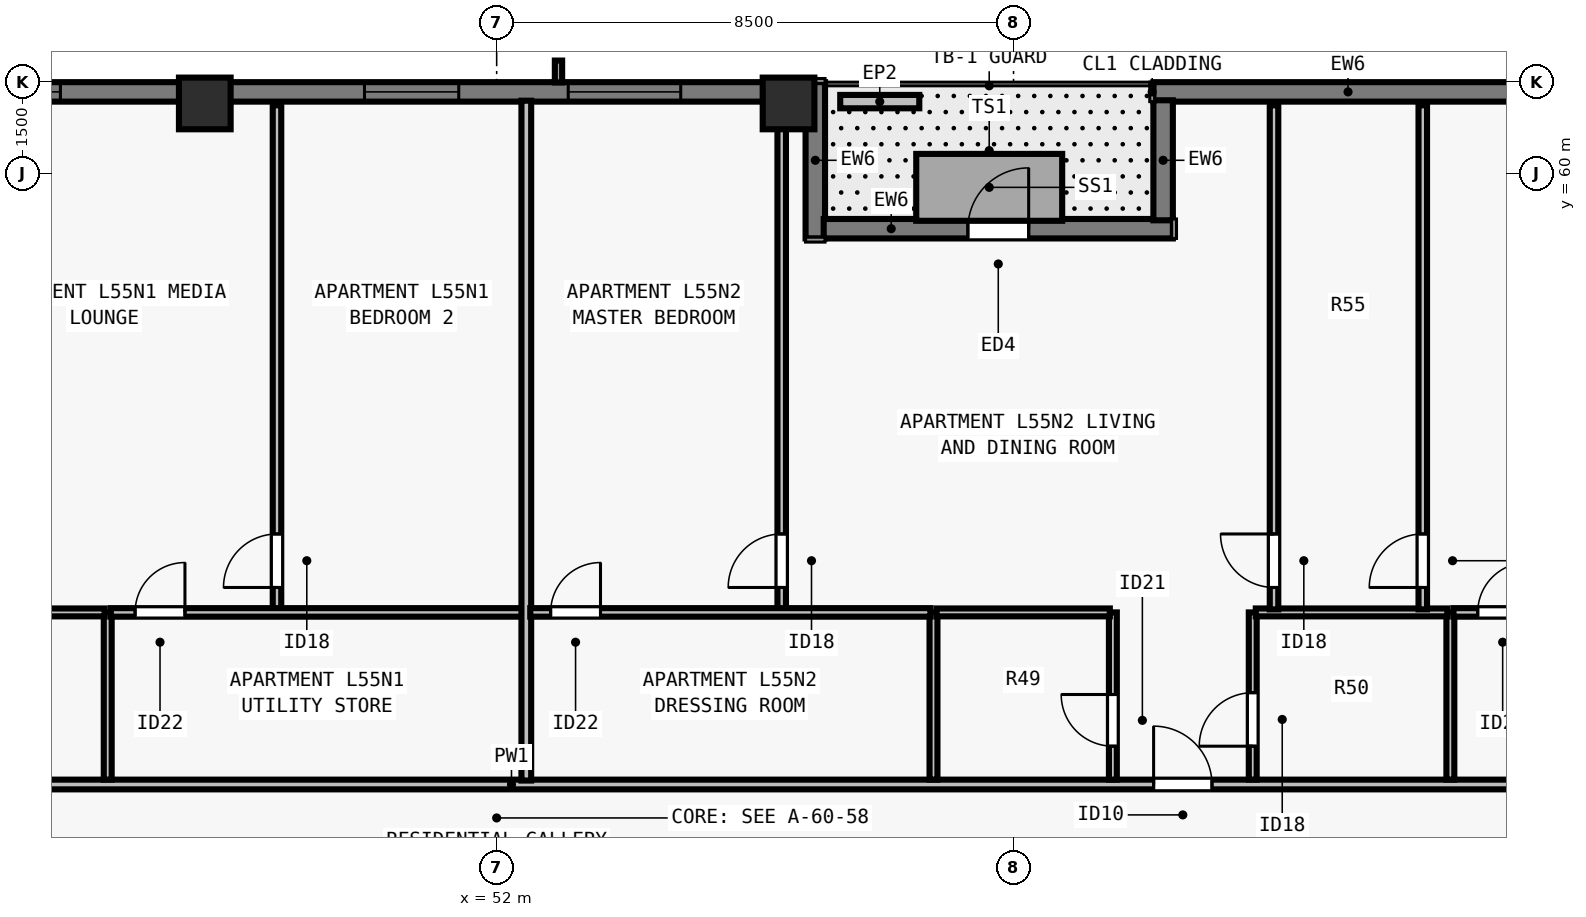
"""IFC4 building model, lengths in metres.
Left out: names, types, materials, properties, quantities, classifications, styles, units other than length and angle.
Written with IfcOpenShell. Run it as: python <this file> out.ifc"""

import sys

from ifc_helpers import new_model, si_unit, direction, frame, frame_2d, origin, origin_2d, place, context, subcontext, project, spatial, rectangle, extrude, element, fill, save


model = new_model("IFC4")
c1 = context("Model", 3, precision=1e-05, world=origin(), true_north=direction((0.0, 1.0)))
c2 = subcontext(c1, "Body", "Model", "MODEL_VIEW")
j1 = project(units=[si_unit("LENGTHUNIT", "METRE"), si_unit("PLANEANGLEUNIT", "RADIAN")], contexts=[c1])
p1 = place(None, origin())
s1 = spatial("IfcSite", under=j1, at=p1, CompositionType="ELEMENT")
p2 = place(p1, origin())
s2 = spatial("IfcBuilding", under=s1, at=p2, CompositionType="ELEMENT")
p3 = place(p2, frame((0.0, 0.0, 202.5)))
s3 = spatial("IfcBuildingStorey", under=s2, at=p3, CompositionType="ELEMENT", Elevation=202.5)
for number, where, z_axis, x_axis in (
    (1, (56.8, 61.15, 0.0), (0.0, 0.0, 1.0), (1.0, 0.0, 0.0)),
    (2, (47.2, 61.15, 0.0), (0.0, 0.0, 1.0), (1.0, 0.0, 0.0)),
):
    element("IfcColumn", number, at=place(p3, frame(where, z_axis=z_axis, x_axis=x_axis)), inside=s3, PredefinedType="COLUMN", context=c2, shape_type="SweptSolid", body=[
        extrude(rectangle(XDim=0.85, YDim=0.85, at=origin_2d()), origin(), (0.0, 0.0, 1.0), 3.5),
    ])
p4 = place(p3, frame((62.8, 61.34, 0.0), z_axis=(0.0, 0.0, 1.0), x_axis=(1.0, 0.0, 0.0)))
e3 = element("IfcWall", 3, at=p4, inside=s3, PredefinedType="SOLIDWALL", context=c2, shape_type="SweptSolid", body=[
    extrude(rectangle(XDim=6.402, YDim=0.32, at=frame_2d((3.201, 0.0))), origin(), (0.0, 0.0, 1.0), 3.29),
])
p5 = place(p3, frame((34.5, 61.34, 0.0), z_axis=(0.0, 0.0, 1.0), x_axis=(1.0, 0.0, 0.0)))
e4 = element("IfcWall", 4, at=p5, inside=s3, PredefinedType="SOLIDWALL", context=c2, shape_type="SweptSolid", body=[
    extrude(rectangle(XDim=22.602, YDim=0.32, at=frame_2d((11.301, 0.0))), origin(), (0.0, 0.0, 1.0), 3.29),
])
p6 = place(p5, frame((4.675, 0.0, 0.8)))
e5 = element("IfcOpeningElement", 5, at=p6, cuts=e4, PredefinedType="OPENING", context=c2, shape_type="SweptSolid", body=[
    extrude(rectangle(XDim=1.85, YDim=1.678, at=frame_2d((0.925, 0.839))), frame((0.0, 0.17, 0.0), z_axis=(0.0, -1.0, 0.0), x_axis=(1.0, 0.0, 0.0)), (0.0, 0.0, 1.0), 0.34),
])
p7 = place(p5, frame((8.776, 0.0, 0.8)))
e6 = element("IfcOpeningElement", 6, at=p7, cuts=e4, PredefinedType="OPENING", context=c2, shape_type="SweptSolid", body=[
    extrude(rectangle(XDim=1.55, YDim=1.678, at=frame_2d((0.775, 0.839))), frame((0.0, 0.17, 0.0), z_axis=(0.0, -1.0, 0.0), x_axis=(1.0, 0.0, 0.0)), (0.0, 0.0, 1.0), 0.34),
])
p8 = place(p5, frame((15.326, 0.0, 0.8)))
e7 = element("IfcOpeningElement", 7, at=p8, cuts=e4, PredefinedType="OPENING", context=c2, shape_type="SweptSolid", body=[
    extrude(rectangle(XDim=1.55, YDim=1.678, at=frame_2d((0.775, 0.839))), frame((0.0, 0.17, 0.0), z_axis=(0.0, -1.0, 0.0), x_axis=(1.0, 0.0, 0.0)), (0.0, 0.0, 1.0), 0.34),
])
p9 = place(p5, frame((18.677, 0.0, 0.8)))
e8 = element("IfcOpeningElement", 8, at=p9, cuts=e4, PredefinedType="OPENING", context=c2, shape_type="SweptSolid", body=[
    extrude(rectangle(XDim=1.85, YDim=1.678, at=frame_2d((0.925, 0.839))), frame((0.0, 0.17, 0.0), z_axis=(0.0, -1.0, 0.0), x_axis=(1.0, 0.0, 0.0)), (0.0, 0.0, 1.0), 0.34),
])
p10 = place(p3, frame((57.24, 61.5, 0.0), z_axis=(0.0, 0.0, 1.0), x_axis=(0.0, -1.0, 0.0)))
e9 = element("IfcWall", 9, at=p10, inside=s3, PredefinedType="SOLIDWALL", context=c2, shape_type="SweptSolid", body=[
    extrude(rectangle(XDim=2.57, YDim=0.32, at=frame_2d((1.285, 0.0))), origin(), (0.0, 0.0, 1.0), 3.29),
])
p11 = place(p3, frame((57.378, 59.09, 0.0), z_axis=(0.0, 0.0, 1.0), x_axis=(1.0, 0.0, 0.0)))
e10 = element("IfcWall", 10, at=p11, inside=s3, PredefinedType="SOLIDWALL", context=c2, shape_type="SweptSolid", body=[
    extrude(rectangle(XDim=5.742, YDim=0.32, at=frame_2d((2.871, 0.0))), origin(), (0.0, 0.0, 1.0), 3.29),
])
p12 = place(p11, frame((2.371, 0.0, 0.0)))
e11 = element("IfcOpeningElement", 11, at=p12, cuts=e10, PredefinedType="OPENING", context=c2, shape_type="SweptSolid", body=[
    extrude(rectangle(XDim=1.0, YDim=2.15, at=frame_2d((0.5, 1.075))), frame((0.0, 0.17, 0.0), z_axis=(0.0, -1.0, 0.0), x_axis=(1.0, 0.0, 0.0)), (0.0, 0.0, 1.0), 0.34),
])
p13 = place(p3, frame((62.96, 59.228, 0.0), z_axis=(0.0, 0.0, 1.0), x_axis=(0.0, 1.0, 0.0)))
e12 = element("IfcWall", 12, at=p13, inside=s3, PredefinedType="SOLIDWALL", context=c2, shape_type="SweptSolid", body=[
    extrude(rectangle(XDim=1.974, YDim=0.32, at=frame_2d((0.987, 0.0))), origin(), (0.0, 0.0, 1.0), 3.29),
])
p14 = place(p3, frame((57.65, 61.18, 0.0), z_axis=(0.0, 0.0, 1.0), x_axis=(1.0, 0.0, 0.0)))
e13 = element("IfcWall", 13, at=p14, inside=s3, PredefinedType="PARAPET", context=c2, shape_type="SweptSolid", body=[
    extrude(rectangle(XDim=1.3, YDim=0.22, at=frame_2d((0.65, 0.0))), origin(), (0.0, 0.0, 1.0), 0.55),
])
p15 = place(p3, frame((29.805, 49.95, 0.0), z_axis=(0.0, 0.0, 1.0), x_axis=(1.0, 0.0, 0.0)))
e14 = element("IfcWall", 14, at=p15, inside=s3, PredefinedType="PARTITIONING", context=c2, shape_type="SweptSolid", body=[
    extrude(rectangle(XDim=44.39, YDim=0.16, at=frame_2d((22.195, 0.0))), origin(), (0.0, 0.0, 1.0), 2.958),
])
p16 = place(p15, frame((10.919, 0.0, 0.0)))
e15 = element("IfcOpeningElement", 15, at=p16, cuts=e14, PredefinedType="OPENING", context=c2, shape_type="SweptSolid", body=[
    extrude(rectangle(XDim=0.96, YDim=2.18, at=frame_2d((0.48, 1.09))), frame((0.0, 0.09, 0.0), z_axis=(0.0, -1.0, 0.0), x_axis=(1.0, 0.0, 0.0)), (0.0, 0.0, 1.0), 0.18),
])
p17 = place(p15, frame((32.999, 0.0, 0.0)))
e16 = element("IfcOpeningElement", 16, at=p17, cuts=e14, PredefinedType="OPENING", context=c2, shape_type="SweptSolid", body=[
    extrude(rectangle(XDim=0.96, YDim=2.18, at=frame_2d((0.48, 1.09))), frame((0.0, 0.09, 0.0), z_axis=(0.0, -1.0, 0.0), x_axis=(1.0, 0.0, 0.0)), (0.0, 0.0, 1.0), 0.18),
])
p18 = place(p3, frame((45.604, 50.03, 0.0), z_axis=(0.0, 0.0, 1.0), x_axis=(0.0, 1.0, 0.0)))
e17 = element("IfcWall", 17, at=p18, inside=s3, PredefinedType="PLUMBINGWALL", context=c2, shape_type="SweptSolid", body=[
    extrude(rectangle(XDim=2.75, YDim=0.13, at=frame_2d((1.375, 0.0))), origin(), (0.0, 0.0, 1.0), 3.29),
])
p19 = place(p3, frame((42.404, 52.78, 0.0), z_axis=(0.0, 0.0, 1.0), x_axis=(1.0, 0.0, 0.0)))
e18 = element("IfcWall", 18, at=p19, inside=s3, PredefinedType="PLUMBINGWALL", context=c2, shape_type="SweptSolid", body=[
    extrude(rectangle(XDim=3.15, YDim=0.13, at=frame_2d((1.575, 0.0))), origin(), (0.0, 0.0, 1.0), 3.29),
])
p20 = place(p3, frame((48.387, 52.74, 0.0), z_axis=(0.0, 0.0, 1.0), x_axis=(0.0, 1.0, 0.0)))
e19 = element("IfcWall", 19, at=p20, inside=s3, PredefinedType="PARTITIONING", context=c2, shape_type="SweptSolid", body=[
    extrude(rectangle(XDim=8.38, YDim=0.14, at=frame_2d((4.19, 0.0))), origin(), (0.0, 0.0, 1.0), 3.29),
])
p21 = place(p20, frame((0.45, 0.0, 0.0)))
e20 = element("IfcOpeningElement", 20, at=p21, cuts=e19, PredefinedType="OPENING", context=c2, shape_type="SweptSolid", body=[
    extrude(rectangle(XDim=0.88, YDim=2.1, at=frame_2d((0.44, 1.05))), frame((0.0, 0.08, 0.0), z_axis=(0.0, -1.0, 0.0), x_axis=(1.0, 0.0, 0.0)), (0.0, 0.0, 1.0), 0.16),
])
p22 = place(p3, frame((45.654, 52.78, 0.0), z_axis=(0.0, 0.0, 1.0), x_axis=(1.0, 0.0, 0.0)))
e21 = element("IfcWall", 21, at=p22, inside=s3, PredefinedType="PARTITIONING", context=c2, shape_type="SweptSolid", body=[
    extrude(rectangle(XDim=6.884, YDim=0.14, at=frame_2d((3.442, 0.0))), origin(), (0.0, 0.0, 1.0), 3.29),
])
p23 = place(p22, frame((0.4, 0.0, 0.0)))
e22 = element("IfcOpeningElement", 22, at=p23, cuts=e21, PredefinedType="OPENING", context=c2, shape_type="SweptSolid", body=[
    extrude(rectangle(XDim=0.82, YDim=2.1, at=frame_2d((0.41, 1.05))), frame((0.0, 0.08, 0.0), z_axis=(0.0, -1.0, 0.0), x_axis=(1.0, 0.0, 0.0)), (0.0, 0.0, 1.0), 0.16),
])
p24 = place(p3, frame((52.488, 50.015, 0.0), z_axis=(0.0, 0.0, 1.0), x_axis=(0.0, 1.0, 0.0)))
e23 = element("IfcWall", 23, at=p24, inside=s3, PredefinedType="PARTITIONING", context=c2, shape_type="SweptSolid", body=[
    extrude(rectangle(XDim=11.18, YDim=0.16, at=frame_2d((5.59, 0.0))), origin(), (0.0, 0.0, 1.0), 2.958),
])
p25 = place(p3, frame((59.184, 50.03, 0.0), z_axis=(0.0, 0.0, 1.0), x_axis=(0.0, 1.0, 0.0)))
e24 = element("IfcWall", 24, at=p25, inside=s3, PredefinedType="PLUMBINGWALL", context=c2, shape_type="SweptSolid", body=[
    extrude(rectangle(XDim=2.75, YDim=0.13, at=frame_2d((1.375, 0.0))), origin(), (0.0, 0.0, 1.0), 3.29),
])
p26 = place(p3, frame((62.134, 50.03, 0.0), z_axis=(0.0, 0.0, 1.0), x_axis=(0.0, 1.0, 0.0)))
e25 = element("IfcWall", 25, at=p26, inside=s3, PredefinedType="PLUMBINGWALL", context=c2, shape_type="SweptSolid", body=[
    extrude(rectangle(XDim=2.75, YDim=0.13, at=frame_2d((1.375, 0.0))), origin(), (0.0, 0.0, 1.0), 2.573),
])
p27 = place(p26, frame((0.55, 0.0, 0.0)))
e26 = element("IfcOpeningElement", 26, at=p27, cuts=e25, PredefinedType="OPENING", context=c2, shape_type="SweptSolid", body=[
    extrude(rectangle(XDim=0.85, YDim=2.08, at=frame_2d((0.425, 1.04))), frame((0.0, 0.075, 0.0), z_axis=(0.0, -1.0, 0.0), x_axis=(1.0, 0.0, 0.0)), (0.0, 0.0, 1.0), 0.15),
])
p28 = place(p3, frame((59.234, 52.78, 0.0), z_axis=(0.0, 0.0, 1.0), x_axis=(1.0, 0.0, 0.0)))
e27 = element("IfcWall", 27, at=p28, inside=s3, PredefinedType="PLUMBINGWALL", context=c2, shape_type="SweptSolid", body=[
    extrude(rectangle(XDim=2.85, YDim=0.13, at=frame_2d((1.425, 0.0))), origin(), (0.0, 0.0, 1.0), 3.29),
])
p29 = place(p3, frame((67.684, 50.03, 0.0), z_axis=(0.0, 0.0, 1.0), x_axis=(0.0, 1.0, 0.0)))
e28 = element("IfcWall", 28, at=p29, inside=s3, PredefinedType="PLUMBINGWALL", context=c2, shape_type="SweptSolid", body=[
    extrude(rectangle(XDim=2.75, YDim=0.13, at=frame_2d((1.375, 0.0))), origin(), (0.0, 0.0, 1.0), 3.29),
])
p30 = place(p3, frame((64.434, 50.03, 0.0), z_axis=(0.0, 0.0, 1.0), x_axis=(0.0, 1.0, 0.0)))
e29 = element("IfcWall", 29, at=p30, inside=s3, PredefinedType="PLUMBINGWALL", context=c2, shape_type="SweptSolid", body=[
    extrude(rectangle(XDim=2.75, YDim=0.13, at=frame_2d((1.375, 0.0))), origin(), (0.0, 0.0, 1.0), 3.29),
])
p31 = place(p30, frame((0.55, 0.0, 0.0)))
e30 = element("IfcOpeningElement", 30, at=p31, cuts=e29, PredefinedType="OPENING", context=c2, shape_type="SweptSolid", body=[
    extrude(rectangle(XDim=0.88, YDim=2.1, at=frame_2d((0.44, 1.05))), frame((0.0, 0.075, 0.0), z_axis=(0.0, -1.0, 0.0), x_axis=(1.0, 0.0, 0.0)), (0.0, 0.0, 1.0), 0.15),
])
p32 = place(p3, frame((64.484, 52.78, 0.0), z_axis=(0.0, 0.0, 1.0), x_axis=(1.0, 0.0, 0.0)))
e31 = element("IfcWall", 31, at=p32, inside=s3, PredefinedType="PLUMBINGWALL", context=c2, shape_type="SweptSolid", body=[
    extrude(rectangle(XDim=3.15, YDim=0.13, at=frame_2d((1.575, 0.0))), origin(), (0.0, 0.0, 1.0), 3.29),
])
p33 = place(p3, frame((56.688, 52.74, 0.0), z_axis=(0.0, 0.0, 1.0), x_axis=(0.0, 1.0, 0.0)))
e32 = element("IfcWall", 32, at=p33, inside=s3, PredefinedType="PARTITIONING", context=c2, shape_type="SweptSolid", body=[
    extrude(rectangle(XDim=8.38, YDim=0.14, at=frame_2d((4.19, 0.0))), origin(), (0.0, 0.0, 1.0), 2.573),
])
p34 = place(p33, frame((0.45, 0.0, 0.0)))
e33 = element("IfcOpeningElement", 33, at=p34, cuts=e32, PredefinedType="OPENING", context=c2, shape_type="SweptSolid", body=[
    extrude(rectangle(XDim=0.88, YDim=2.1, at=frame_2d((0.44, 1.05))), frame((0.0, 0.08, 0.0), z_axis=(0.0, -1.0, 0.0), x_axis=(1.0, 0.0, 0.0)), (0.0, 0.0, 1.0), 0.16),
])
p35 = place(p3, frame((52.552, 52.78, 0.0), z_axis=(0.0, 0.0, 1.0), x_axis=(1.0, 0.0, 0.0)))
e34 = element("IfcWall", 34, at=p35, inside=s3, PredefinedType="PARTITIONING", context=c2, shape_type="SweptSolid", body=[
    extrude(rectangle(XDim=6.581, YDim=0.14, at=frame_2d((3.291, 0.0))), origin(), (0.0, 0.0, 1.0), 3.29),
])
p36 = place(p35, frame((0.335, 0.0, 0.0)))
e35 = element("IfcOpeningElement", 35, at=p36, cuts=e34, PredefinedType="OPENING", context=c2, shape_type="SweptSolid", body=[
    extrude(rectangle(XDim=0.82, YDim=2.1, at=frame_2d((0.41, 1.05))), frame((0.0, 0.08, 0.0), z_axis=(0.0, -1.0, 0.0), x_axis=(1.0, 0.0, 0.0)), (0.0, 0.0, 1.0), 0.16),
])
p37 = place(p3, frame((67.23, 52.83, 0.0), z_axis=(0.0, 0.0, 1.0), x_axis=(0.0, 1.0, 0.0)))
e36 = element("IfcWall", 36, at=p37, inside=s3, PredefinedType="PARTITIONING", context=c2, shape_type="SweptSolid", body=[
    extrude(rectangle(XDim=8.29, YDim=0.14, at=frame_2d((4.145, 0.0))), origin(), (0.0, 0.0, 1.0), 2.573),
])
p38 = place(p37, frame((0.36, 0.0, 0.0)))
e37 = element("IfcOpeningElement", 37, at=p38, cuts=e36, PredefinedType="OPENING", context=c2, shape_type="SweptSolid", body=[
    extrude(rectangle(XDim=0.88, YDim=2.1, at=frame_2d((0.44, 1.05))), frame((0.0, 0.08, 0.0), z_axis=(0.0, -1.0, 0.0), x_axis=(1.0, 0.0, 0.0)), (0.0, 0.0, 1.0), 0.16),
])
p39 = place(p3, frame((67.734, 52.78, 0.0), z_axis=(0.0, 0.0, 1.0), x_axis=(1.0, 0.0, 0.0)))
e38 = element("IfcWall", 38, at=p39, inside=s3, PredefinedType="PARTITIONING", context=c2, shape_type="SweptSolid", body=[
    extrude(rectangle(XDim=6.396, YDim=0.14, at=frame_2d((3.198, 0.0))), origin(), (0.0, 0.0, 1.0), 2.958),
])
p40 = place(p39, frame((0.4, 0.0, 0.0)))
e39 = element("IfcOpeningElement", 39, at=p40, cuts=e38, PredefinedType="OPENING", context=c2, shape_type="SweptSolid", body=[
    extrude(rectangle(XDim=0.82, YDim=2.1, at=frame_2d((0.41, 1.05))), frame((0.0, 0.08, 0.0), z_axis=(0.0, -1.0, 0.0), x_axis=(1.0, 0.0, 0.0)), (0.0, 0.0, 1.0), 0.16),
])
p41 = place(p3, frame((64.784, 52.83, 0.0), z_axis=(0.0, 0.0, 1.0), x_axis=(0.0, 1.0, 0.0)))
e40 = element("IfcWall", 40, at=p41, inside=s3, PredefinedType="PARTITIONING", context=c2, shape_type="SweptSolid", body=[
    extrude(rectangle(XDim=8.29, YDim=0.14, at=frame_2d((4.145, 0.0))), origin(), (0.0, 0.0, 1.0), 2.573),
])
p42 = place(p41, frame((0.36, 0.0, 0.0)))
e41 = element("IfcOpeningElement", 41, at=p42, cuts=e40, PredefinedType="OPENING", context=c2, shape_type="SweptSolid", body=[
    extrude(rectangle(XDim=0.88, YDim=2.1, at=frame_2d((0.44, 1.05))), frame((0.0, 0.08, 0.0), z_axis=(0.0, -1.0, 0.0), x_axis=(1.0, 0.0, 0.0)), (0.0, 0.0, 1.0), 0.16),
])
p43 = place(p7, origin())
e42 = element("IfcWindow", 42, at=p43, inside=s3, PartitioningType="SINGLE_PANEL", PredefinedType="WINDOW", context=c2, shape_type="SweptSolid", body=[
    extrude(rectangle(XDim=1.55, YDim=1.678, at=frame_2d((0.775, 0.839))), frame((0.0, -0.05, 0.0), z_axis=(0.0, -1.0, 0.0), x_axis=(1.0, 0.0, 0.0)), (0.0, 0.0, 1.0), 0.06),
])
fill(e6, e42)
p44 = place(p8, origin())
e43 = element("IfcWindow", 43, at=p44, inside=s3, PartitioningType="SINGLE_PANEL", PredefinedType="WINDOW", context=c2, shape_type="SweptSolid", body=[
    extrude(rectangle(XDim=1.55, YDim=1.678, at=frame_2d((0.775, 0.839))), frame((0.0, -0.05, 0.0), z_axis=(0.0, -1.0, 0.0), x_axis=(1.0, 0.0, 0.0)), (0.0, 0.0, 1.0), 0.06),
])
fill(e7, e43)
p45 = place(p9, origin())
e44 = element("IfcWindow", 44, at=p45, inside=s3, PartitioningType="SINGLE_PANEL", PredefinedType="WINDOW", context=c2, shape_type="SweptSolid", body=[
    extrude(rectangle(XDim=1.85, YDim=1.678, at=frame_2d((0.925, 0.839))), frame((0.0, -0.05, 0.0), z_axis=(0.0, -1.0, 0.0), x_axis=(1.0, 0.0, 0.0)), (0.0, 0.0, 1.0), 0.06),
])
fill(e8, e44)
p46 = place(p12, origin())
e45 = element("IfcDoor", 45, at=p46, inside=s3, OperationType="SINGLE_SWING_RIGHT", PredefinedType="DOOR", context=c2, shape_type="SweptSolid", body=[
    extrude(rectangle(XDim=1.0, YDim=2.15, at=frame_2d((0.5, 1.075))), frame((0.0, 0.025, 0.0), z_axis=(0.0, -1.0, 0.0), x_axis=(1.0, 0.0, 0.0)), (0.0, 0.0, 1.0), 0.05),
])
fill(e11, e45)
p47 = place(p23, origin())
e46 = element("IfcDoor", 46, at=p47, inside=s3, OperationType="SINGLE_SWING_RIGHT", PredefinedType="DOOR", context=c2, shape_type="SweptSolid", body=[
    extrude(rectangle(XDim=0.82, YDim=2.1, at=frame_2d((0.41, 1.05))), frame((0.0, 0.025, 0.0), z_axis=(0.0, -1.0, 0.0), x_axis=(1.0, 0.0, 0.0)), (0.0, 0.0, 1.0), 0.05),
])
fill(e22, e46)
p48 = place(p21, origin())
e47 = element("IfcDoor", 47, at=p48, inside=s3, OperationType="SINGLE_SWING_LEFT", PredefinedType="DOOR", context=c2, shape_type="SweptSolid", body=[
    extrude(rectangle(XDim=0.88, YDim=2.1, at=frame_2d((0.44, 1.05))), frame((0.0, 0.025, 0.0), z_axis=(0.0, -1.0, 0.0), x_axis=(1.0, 0.0, 0.0)), (0.0, 0.0, 1.0), 0.05),
])
fill(e20, e47)
p49 = place(p27, origin())
e48 = element("IfcDoor", 48, at=p49, inside=s3, OperationType="SINGLE_SWING_RIGHT", PredefinedType="DOOR", context=c2, shape_type="SweptSolid", body=[
    extrude(rectangle(XDim=0.85, YDim=2.08, at=frame_2d((0.425, 1.04))), frame((0.0, 0.025, 0.0), z_axis=(0.0, -1.0, 0.0), x_axis=(1.0, 0.0, 0.0)), (0.0, 0.0, 1.0), 0.05),
])
fill(e26, e48)
p50 = place(p31, origin())
e49 = element("IfcDoor", 49, at=p50, inside=s3, OperationType="SINGLE_SWING_LEFT", PredefinedType="DOOR", context=c2, shape_type="SweptSolid", body=[
    extrude(rectangle(XDim=0.88, YDim=2.1, at=frame_2d((0.44, 1.05))), frame((0.0, 0.025, 0.0), z_axis=(0.0, -1.0, 0.0), x_axis=(1.0, 0.0, 0.0)), (0.0, 0.0, 1.0), 0.05),
])
fill(e30, e49)
p51 = place(p36, origin())
e50 = element("IfcDoor", 50, at=p51, inside=s3, OperationType="SINGLE_SWING_RIGHT", PredefinedType="DOOR", context=c2, shape_type="SweptSolid", body=[
    extrude(rectangle(XDim=0.82, YDim=2.1, at=frame_2d((0.41, 1.05))), frame((0.0, 0.025, 0.0), z_axis=(0.0, -1.0, 0.0), x_axis=(1.0, 0.0, 0.0)), (0.0, 0.0, 1.0), 0.05),
])
fill(e35, e50)
p52 = place(p34, origin())
e51 = element("IfcDoor", 51, at=p52, inside=s3, OperationType="SINGLE_SWING_LEFT", PredefinedType="DOOR", context=c2, shape_type="SweptSolid", body=[
    extrude(rectangle(XDim=0.88, YDim=2.1, at=frame_2d((0.44, 1.05))), frame((0.0, 0.025, 0.0), z_axis=(0.0, -1.0, 0.0), x_axis=(1.0, 0.0, 0.0)), (0.0, 0.0, 1.0), 0.05),
])
fill(e33, e51)
p53 = place(p40, origin())
e52 = element("IfcDoor", 52, at=p53, inside=s3, OperationType="SINGLE_SWING_RIGHT", PredefinedType="DOOR", context=c2, shape_type="SweptSolid", body=[
    extrude(rectangle(XDim=0.82, YDim=2.1, at=frame_2d((0.41, 1.05))), frame((0.0, 0.025, 0.0), z_axis=(0.0, -1.0, 0.0), x_axis=(1.0, 0.0, 0.0)), (0.0, 0.0, 1.0), 0.05),
])
fill(e39, e52)
p54 = place(p38, origin())
e53 = element("IfcDoor", 53, at=p54, inside=s3, OperationType="SINGLE_SWING_LEFT", PredefinedType="DOOR", context=c2, shape_type="SweptSolid", body=[
    extrude(rectangle(XDim=0.88, YDim=2.1, at=frame_2d((0.44, 1.05))), frame((0.0, 0.025, 0.0), z_axis=(0.0, -1.0, 0.0), x_axis=(1.0, 0.0, 0.0)), (0.0, 0.0, 1.0), 0.05),
])
fill(e37, e53)
p55 = place(p42, origin())
e54 = element("IfcDoor", 54, at=p55, inside=s3, OperationType="SINGLE_SWING_RIGHT", PredefinedType="DOOR", context=c2, shape_type="SweptSolid", body=[
    extrude(rectangle(XDim=0.88, YDim=2.1, at=frame_2d((0.44, 1.05))), frame((0.0, 0.025, 0.0), z_axis=(0.0, -1.0, 0.0), x_axis=(1.0, 0.0, 0.0)), (0.0, 0.0, 1.0), 0.05),
])
fill(e41, e54)
p56 = place(p17, origin())
e55 = element("IfcDoor", 55, at=p56, inside=s3, OperationType="SINGLE_SWING_LEFT", PredefinedType="DOOR", context=c2, shape_type="SweptSolid", body=[
    extrude(rectangle(XDim=0.96, YDim=2.18, at=frame_2d((0.48, 1.09))), frame((0.0, 0.025, 0.0), z_axis=(0.0, -1.0, 0.0), x_axis=(1.0, 0.0, 0.0)), (0.0, 0.0, 1.0), 0.05),
])
fill(e16, e55)
save(model, sys.argv[1])
